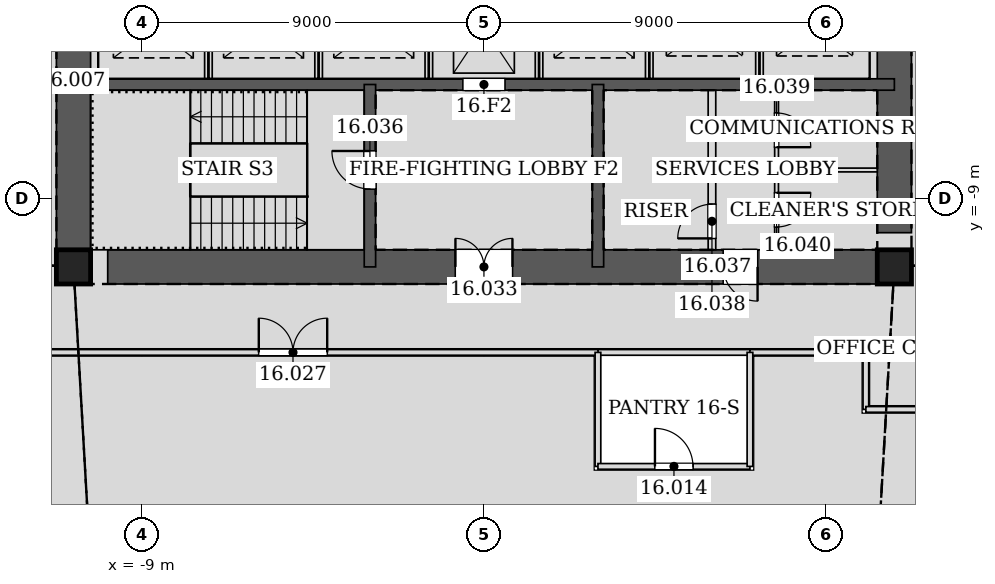
"""IFC4 building model, lengths in metres.
Left out: names, types, materials, properties, quantities, classifications, styles, units other than length and angle.
Written with IfcOpenShell. Run it as: python <this file> out.ifc"""

import sys

from ifc_helpers import new_model, si_unit, direction, frame, frame_2d, origin, origin_2d, place, context, subcontext, project, spatial, rectangle, hollow_rectangle, extrude, element, fill, save


model = new_model("IFC4")
c1 = context("Model", 3, precision=1e-05, world=origin(), true_north=direction((0.0, 1.0)))
c2 = subcontext(c1, "Body", "Model", "MODEL_VIEW")
j1 = project(units=[si_unit("LENGTHUNIT", "METRE"), si_unit("PLANEANGLEUNIT", "RADIAN")], contexts=[c1])
p1 = place(None, origin())
s1 = spatial("IfcSite", under=j1, at=p1, CompositionType="ELEMENT")
p2 = place(p1, origin())
s2 = spatial("IfcBuilding", under=s1, at=p2, CompositionType="ELEMENT")
p3 = place(p2, frame((0.0, 0.0, 75.0)))
s3 = spatial("IfcBuildingStorey", under=s2, at=p3, CompositionType="ELEMENT", Elevation=75.0)
for number, where, z_axis, x_axis in (
    (1, (-10.8, -10.8, 0.0), (0.0, 0.0, 1.0), (1.0, 0.0, 0.0)),
    (2, (10.8, -10.8, 0.0), (0.0, 0.0, 1.0), (1.0, 0.0, 0.0)),
):
    element("IfcColumn", number, at=place(p3, frame(where, z_axis=z_axis, x_axis=x_axis)), inside=s3, PredefinedType="COLUMN", context=c2, shape_type="SweptSolid", body=[
        extrude(hollow_rectangle(XDim=0.9, YDim=0.9, WallThickness=0.06, at=origin_2d()), origin(), (0.0, 0.0, 1.0), 4.2),
    ])
p4 = place(p3, frame((-10.8, -10.8, 0.0), z_axis=(0.0, 0.0, 1.0), x_axis=(1.0, 0.0, 0.0)))
e3 = element("IfcWall", 3, at=p4, inside=s3, PredefinedType="SOLIDWALL", context=c2, shape_type="SweptSolid", body=[
    extrude(rectangle(XDim=21.6, YDim=0.9, at=frame_2d((10.8, 0.0))), origin(), (0.0, 0.0, 1.0), 4.2),
])
p5 = place(p4, frame((10.05, 0.0, 0.0)))
e4 = element("IfcOpeningElement", 4, at=p5, cuts=e3, PredefinedType="OPENING", context=c2, shape_type="SweptSolid", body=[
    extrude(rectangle(XDim=1.5, YDim=2.1, at=frame_2d((0.75, 1.05))), frame((0.0, 0.46, 0.0), z_axis=(0.0, -1.0, 0.0), x_axis=(1.0, 0.0, 0.0)), (0.0, 0.0, 1.0), 0.92),
])
p6 = place(p4, frame((17.1, 0.0, 0.0)))
e5 = element("IfcOpeningElement", 5, at=p6, cuts=e3, PredefinedType="OPENING", context=c2, shape_type="SweptSolid", body=[
    extrude(rectangle(XDim=0.9, YDim=2.1, at=frame_2d((0.45, 1.05))), frame((0.0, 0.46, 0.0), z_axis=(0.0, -1.0, 0.0), x_axis=(1.0, 0.0, 0.0)), (0.0, 0.0, 1.0), 0.92),
])
p7 = place(p3, frame((10.8, -10.8, 0.0), z_axis=(0.0, 0.0, 1.0), x_axis=(0.0, 1.0, 0.0)))
e6 = element("IfcWall", 6, at=p7, inside=s3, PredefinedType="SOLIDWALL", context=c2, shape_type="SweptSolid", body=[
    extrude(rectangle(XDim=21.6, YDim=0.9, at=frame_2d((10.8, 0.0))), origin(), (0.0, 0.0, 1.0), 4.2),
])
p8 = place(p7, frame((11.7, 0.0, 0.0)))
e7 = element("IfcOpeningElement", 7, at=p8, cuts=e6, PredefinedType="OPENING", context=c2, shape_type="SweptSolid", body=[
    extrude(rectangle(XDim=1.2, YDim=2.1, at=frame_2d((0.6, 1.05))), frame((0.0, 0.46, 0.0), z_axis=(0.0, -1.0, 0.0), x_axis=(1.0, 0.0, 0.0)), (0.0, 0.0, 1.0), 0.92),
])
p9 = place(p7, frame((8.7, 0.0, 0.0)))
e8 = element("IfcOpeningElement", 8, at=p9, cuts=e6, PredefinedType="OPENING", context=c2, shape_type="SweptSolid", body=[
    extrude(rectangle(XDim=1.2, YDim=2.1, at=frame_2d((0.6, 1.05))), frame((0.0, 0.46, 0.0), z_axis=(0.0, -1.0, 0.0), x_axis=(1.0, 0.0, 0.0)), (0.0, 0.0, 1.0), 0.92),
])
p10 = place(p3, frame((-10.8, 10.8, 0.0), z_axis=(0.0, 0.0, 1.0), x_axis=(0.0, -1.0, 0.0)))
e9 = element("IfcWall", 9, at=p10, inside=s3, PredefinedType="SOLIDWALL", context=c2, shape_type="SweptSolid", body=[
    extrude(rectangle(XDim=21.6, YDim=0.9, at=frame_2d((10.8, 0.0))), origin(), (0.0, 0.0, 1.0), 4.2),
])
p11 = place(p10, frame((8.7, 0.0, 0.0)))
e10 = element("IfcOpeningElement", 10, at=p11, cuts=e9, PredefinedType="OPENING", context=c2, shape_type="SweptSolid", body=[
    extrude(rectangle(XDim=1.2, YDim=2.1, at=frame_2d((0.6, 1.05))), frame((0.0, 0.46, 0.0), z_axis=(0.0, -1.0, 0.0), x_axis=(1.0, 0.0, 0.0)), (0.0, 0.0, 1.0), 0.92),
])
p12 = place(p10, frame((11.7, 0.0, 0.0)))
e11 = element("IfcOpeningElement", 11, at=p12, cuts=e9, PredefinedType="OPENING", context=c2, shape_type="SweptSolid", body=[
    extrude(rectangle(XDim=1.2, YDim=2.1, at=frame_2d((0.6, 1.05))), frame((0.0, 0.46, 0.0), z_axis=(0.0, -1.0, 0.0), x_axis=(1.0, 0.0, 0.0)), (0.0, 0.0, 1.0), 0.92),
])
p13 = place(p3, frame((-10.8, -6.0, 0.0), z_axis=(0.0, 0.0, 1.0), x_axis=(1.0, 0.0, 0.0)))
e12 = element("IfcWall", 12, at=p13, inside=s3, PredefinedType="SOLIDWALL", context=c2, shape_type="SweptSolid", body=[
    extrude(rectangle(XDim=21.6, YDim=0.3, at=frame_2d((10.8, 0.0))), origin(), (0.0, 0.0, 1.0), 4.2),
])
p14 = place(p13, frame((10.25, 0.0, 0.0)))
e13 = element("IfcOpeningElement", 13, at=p14, cuts=e12, PredefinedType="OPENING", context=c2, shape_type="SweptSolid", body=[
    extrude(rectangle(XDim=1.1, YDim=2.1, at=frame_2d((0.55, 1.05))), frame((0.0, 0.16, 0.0), z_axis=(0.0, -1.0, 0.0), x_axis=(1.0, 0.0, 0.0)), (0.0, 0.0, 1.0), 0.32),
])
p15 = place(p3, frame((-3.0, -6.0, 0.0), z_axis=(0.0, 0.0, 1.0), x_axis=(0.0, -1.0, 0.0)))
e14 = element("IfcWall", 14, at=p15, inside=s3, PredefinedType="SOLIDWALL", context=c2, shape_type="SweptSolid", body=[
    extrude(rectangle(XDim=4.8, YDim=0.3, at=frame_2d((2.4, 0.0))), origin(), (0.0, 0.0, 1.0), 4.2),
])
p16 = place(p15, frame((1.75, 0.0, 0.0)))
e15 = element("IfcOpeningElement", 15, at=p16, cuts=e14, PredefinedType="OPENING", context=c2, shape_type="SweptSolid", body=[
    extrude(rectangle(XDim=1.0, YDim=2.1, at=frame_2d((0.5, 1.05))), frame((0.0, 0.16, 0.0), z_axis=(0.0, -1.0, 0.0), x_axis=(1.0, 0.0, 0.0)), (0.0, 0.0, 1.0), 0.32),
])
p17 = place(p3, frame((3.0, -6.0, 0.0), z_axis=(0.0, 0.0, 1.0), x_axis=(0.0, -1.0, 0.0)))
e16 = element("IfcWall", 16, at=p17, inside=s3, PredefinedType="SOLIDWALL", context=c2, shape_type="SweptSolid", body=[
    extrude(rectangle(XDim=4.8, YDim=0.3, at=frame_2d((2.4, 0.0))), origin(), (0.0, 0.0, 1.0), 4.2),
])
p18 = place(p3, frame((2.999, -13.05, 0.0), z_axis=(0.0, 0.0, 1.0), x_axis=(1.0, 0.0, 0.0)))
e17 = element("IfcWall", 17, at=p18, inside=s3, PredefinedType="PARTITIONING", context=c2, shape_type="SweptSolid", body=[
    extrude(rectangle(XDim=4.002, YDim=0.15, at=frame_2d((2.001, 0.0))), origin(), (0.0, 0.0, 1.0), 4.035),
])
p19 = place(p3, frame((-13.05, -13.05, 0.0), z_axis=(0.0, 0.0, 1.0), x_axis=(1.0, 0.0, 0.0)))
e18 = element("IfcWall", 18, at=p19, inside=s3, PredefinedType="PARTITIONING", context=c2, shape_type="SweptSolid", body=[
    extrude(rectangle(XDim=16.051, YDim=0.15, at=frame_2d((8.025, 0.0))), origin(), (0.0, 0.0, 1.0), 3.014),
])
p20 = place(p19, frame((7.125, 0.0, 0.0)))
e19 = element("IfcOpeningElement", 19, at=p20, cuts=e18, PredefinedType="OPENING", context=c2, shape_type="SweptSolid", body=[
    extrude(rectangle(XDim=1.8, YDim=2.4, at=frame_2d((0.9, 1.2))), frame((0.0, 0.085, 0.0), z_axis=(0.0, -1.0, 0.0), x_axis=(1.0, 0.0, 0.0)), (0.0, 0.0, 1.0), 0.17),
])
p21 = place(p3, frame((6.999, -13.05, 0.0), z_axis=(0.0, 0.0, 1.0), x_axis=(1.0, 0.0, 0.0)))
e20 = element("IfcWall", 20, at=p21, inside=s3, PredefinedType="PARTITIONING", context=c2, shape_type="SweptSolid", body=[
    extrude(rectangle(XDim=3.051, YDim=0.15, at=frame_2d((1.525, 0.0))), origin(), (0.0, 0.0, 1.0), 4.035),
])
p22 = place(p3, frame((10.05, -13.05, 0.0), z_axis=(0.0, 0.0, 1.0), x_axis=(0.0, -1.0, 0.0)))
e21 = element("IfcWall", 21, at=p22, inside=s3, PredefinedType="PARTITIONING", context=c2, shape_type="SweptSolid", body=[
    extrude(rectangle(XDim=1.5, YDim=0.15, at=frame_2d((0.75, 0.0))), origin(), (0.0, 0.0, 1.0), 3.492),
])
p23 = place(p3, frame((10.05, -14.55, 0.0), z_axis=(0.0, 0.0, 1.0), x_axis=(1.0, 0.0, 0.0)))
e22 = element("IfcWall", 22, at=p23, inside=s3, PredefinedType="PARTITIONING", context=c2, shape_type="SweptSolid", body=[
    extrude(rectangle(XDim=4.5, YDim=0.15, at=frame_2d((2.25, 0.0))), origin(), (0.0, 0.0, 1.0), 3.014),
])
p24 = place(p3, frame((3.0, -13.05, 0.0), z_axis=(0.0, 0.0, 1.0), x_axis=(0.0, -1.0, 0.0)))
e23 = element("IfcWall", 23, at=p24, inside=s3, PredefinedType="PARTITIONING", context=c2, shape_type="SweptSolid", body=[
    extrude(rectangle(XDim=3.0, YDim=0.15, at=frame_2d((1.5, 0.0))), origin(), (0.0, 0.0, 1.0), 3.492),
])
p25 = place(p3, frame((3.0, -16.05, 0.0), z_axis=(0.0, 0.0, 1.0), x_axis=(1.0, 0.0, 0.0)))
e24 = element("IfcWall", 24, at=p25, inside=s3, PredefinedType="PARTITIONING", context=c2, shape_type="SweptSolid", body=[
    extrude(rectangle(XDim=4.0, YDim=0.15, at=frame_2d((2.0, 0.0))), origin(), (0.0, 0.0, 1.0), 4.035),
])
p26 = place(p25, frame((1.5, 0.0, 0.0)))
e25 = element("IfcOpeningElement", 25, at=p26, cuts=e24, PredefinedType="OPENING", context=c2, shape_type="SweptSolid", body=[
    extrude(rectangle(XDim=1.0, YDim=2.1, at=frame_2d((0.5, 1.05))), frame((0.0, 0.085, 0.0), z_axis=(0.0, -1.0, 0.0), x_axis=(1.0, 0.0, 0.0)), (0.0, 0.0, 1.0), 0.17),
])
p27 = place(p3, frame((7.0, -16.05, 0.0), z_axis=(0.0, 0.0, 1.0), x_axis=(0.0, 1.0, 0.0)))
e26 = element("IfcWall", 26, at=p27, inside=s3, PredefinedType="PARTITIONING", context=c2, shape_type="SweptSolid", body=[
    extrude(rectangle(XDim=3.0, YDim=0.15, at=frame_2d((1.5, 0.0))), origin(), (0.0, 0.0, 1.0), 3.492),
])
for number, where, z_axis, x_axis in (
    (27, (-7.25, -5.85, 0.0), (0.0, 0.0, 1.0), (0.0, 1.0, 0.0)),
    (28, (-4.35, -5.85, 0.0), (0.0, 0.0, 1.0), (0.0, 1.0, 0.0)),
    (29, (-1.45, -5.85, 0.0), (0.0, 0.0, 1.0), (0.0, 1.0, 0.0)),
    (30, (1.45, -5.85, 0.0), (0.0, 0.0, 1.0), (0.0, 1.0, 0.0)),
    (31, (4.35, -5.85, 0.0), (0.0, 0.0, 1.0), (0.0, 1.0, 0.0)),
    (32, (7.25, -5.85, 0.0), (0.0, 0.0, 1.0), (0.0, 1.0, 0.0)),
):
    element("IfcWall", number, at=place(p3, frame(where, z_axis=z_axis, x_axis=x_axis)), inside=s3, PredefinedType="PARTITIONING", context=c2, shape_type="SweptSolid", body=[
        extrude(rectangle(XDim=2.7, YDim=0.2, at=frame_2d((1.35, 0.0))), origin(), (0.0, 0.0, 1.0), 4.2),
    ])
p28 = place(p3, frame((6.0, -10.35, 0.0), z_axis=(0.0, 0.0, 1.0), x_axis=(0.0, 1.0, 0.0)))
e33 = element("IfcWall", 33, at=p28, inside=s3, PredefinedType="PARTITIONING", context=c2, shape_type="SweptSolid", body=[
    extrude(rectangle(XDim=4.2, YDim=0.2, at=frame_2d((2.1, 0.0))), origin(), (0.0, 0.0, 1.0), 4.035),
])
p29 = place(p28, frame((0.3, 0.0, 0.0)))
e34 = element("IfcOpeningElement", 34, at=p29, cuts=e33, PredefinedType="OPENING", context=c2, shape_type="SweptSolid", body=[
    extrude(rectangle(XDim=0.9, YDim=2.1, at=frame_2d((0.45, 1.05))), frame((0.0, 0.11, 0.0), z_axis=(0.0, -1.0, 0.0), x_axis=(1.0, 0.0, 0.0)), (0.0, 0.0, 1.0), 0.22),
])
p30 = place(p3, frame((7.7, -10.35, 0.0), z_axis=(0.0, 0.0, 1.0), x_axis=(0.0, 1.0, 0.0)))
e35 = element("IfcWall", 35, at=p30, inside=s3, PredefinedType="PARTITIONING", context=c2, shape_type="SweptSolid", body=[
    extrude(rectangle(XDim=4.2, YDim=0.1, at=frame_2d((2.1, 0.0))), origin(), (0.0, 0.0, 1.0), 4.035),
])
p31 = place(p30, frame((2.7, 0.0, 0.0)))
e36 = element("IfcOpeningElement", 36, at=p31, cuts=e35, PredefinedType="OPENING", context=c2, shape_type="SweptSolid", body=[
    extrude(rectangle(XDim=0.9, YDim=2.1, at=frame_2d((0.45, 1.05))), frame((0.0, 0.06, 0.0), z_axis=(0.0, -1.0, 0.0), x_axis=(1.0, 0.0, 0.0)), (0.0, 0.0, 1.0), 0.12),
])
p32 = place(p30, frame((0.6, 0.0, 0.0)))
e37 = element("IfcOpeningElement", 37, at=p32, cuts=e35, PredefinedType="OPENING", context=c2, shape_type="SweptSolid", body=[
    extrude(rectangle(XDim=0.9, YDim=2.1, at=frame_2d((0.45, 1.05))), frame((0.0, 0.06, 0.0), z_axis=(0.0, -1.0, 0.0), x_axis=(1.0, 0.0, 0.0)), (0.0, 0.0, 1.0), 0.12),
])
p33 = place(p3, frame((7.7, -8.25, 0.0), z_axis=(0.0, 0.0, 1.0), x_axis=(1.0, 0.0, 0.0)))
e38 = element("IfcWall", 38, at=p33, inside=s3, PredefinedType="PARTITIONING", context=c2, shape_type="SweptSolid", body=[
    extrude(rectangle(XDim=2.65, YDim=0.1, at=frame_2d((1.325, 0.0))), origin(), (0.0, 0.0, 1.0), 4.035),
])
p34 = place(p26, origin())
e39 = element("IfcDoor", 39, at=p34, inside=s3, OperationType="SINGLE_SWING_LEFT", PredefinedType="DOOR", context=c2, shape_type="SweptSolid", body=[
    extrude(rectangle(XDim=1.0, YDim=2.1, at=frame_2d((0.5, 1.05))), frame((0.0, 0.025, 0.0), z_axis=(0.0, -1.0, 0.0), x_axis=(1.0, 0.0, 0.0)), (0.0, 0.0, 1.0), 0.05),
])
fill(e25, e39)
p35 = place(p20, origin())
e40 = element("IfcDoor", 40, at=p35, inside=s3, OperationType="DOUBLE_DOOR_SINGLE_SWING", PredefinedType="DOOR", context=c2, shape_type="SweptSolid", body=[
    extrude(rectangle(XDim=1.8, YDim=2.4, at=frame_2d((0.9, 1.2))), frame((0.0, 0.025, 0.0), z_axis=(0.0, -1.0, 0.0), x_axis=(1.0, 0.0, 0.0)), (0.0, 0.0, 1.0), 0.05),
])
fill(e19, e40)
p36 = place(p5, origin())
e41 = element("IfcDoor", 41, at=p36, inside=s3, OperationType="DOUBLE_DOOR_SINGLE_SWING", PredefinedType="DOOR", context=c2, shape_type="SweptSolid", body=[
    extrude(rectangle(XDim=1.5, YDim=2.1, at=frame_2d((0.75, 1.05))), frame((0.0, 0.025, 0.0), z_axis=(0.0, -1.0, 0.0), x_axis=(1.0, 0.0, 0.0)), (0.0, 0.0, 1.0), 0.05),
])
fill(e4, e41)
p37 = place(p16, frame((1.0, 0.0, 0.0), z_axis=(0.0, 0.0, 1.0), x_axis=(-1.0, 0.0, 0.0)))
e42 = element("IfcDoor", 42, at=p37, inside=s3, OperationType="SINGLE_SWING_RIGHT", PredefinedType="DOOR", context=c2, shape_type="SweptSolid", body=[
    extrude(rectangle(XDim=1.0, YDim=2.1, at=frame_2d((0.5, 1.05))), frame((0.0, 0.025, 0.0), z_axis=(0.0, -1.0, 0.0), x_axis=(1.0, 0.0, 0.0)), (0.0, 0.0, 1.0), 0.05),
])
fill(e15, e42)
p38 = place(p6, frame((0.9, 0.0, 0.0), z_axis=(0.0, 0.0, 1.0), x_axis=(-1.0, 0.0, 0.0)))
e43 = element("IfcDoor", 43, at=p38, inside=s3, OperationType="SINGLE_SWING_LEFT", PredefinedType="DOOR", context=c2, shape_type="SweptSolid", body=[
    extrude(rectangle(XDim=0.9, YDim=2.1, at=frame_2d((0.45, 1.05))), frame((0.0, 0.025, 0.0), z_axis=(0.0, -1.0, 0.0), x_axis=(1.0, 0.0, 0.0)), (0.0, 0.0, 1.0), 0.05),
])
fill(e5, e43)
p39 = place(p29, origin())
e44 = element("IfcDoor", 44, at=p39, inside=s3, OperationType="SINGLE_SWING_LEFT", PredefinedType="DOOR", context=c2, shape_type="SweptSolid", body=[
    extrude(rectangle(XDim=0.9, YDim=2.1, at=frame_2d((0.45, 1.05))), frame((0.0, 0.025, 0.0), z_axis=(0.0, -1.0, 0.0), x_axis=(1.0, 0.0, 0.0)), (0.0, 0.0, 1.0), 0.05),
])
fill(e34, e44)
p40 = place(p31, frame((0.9, 0.0, 0.0), z_axis=(0.0, 0.0, 1.0), x_axis=(-1.0, 0.0, 0.0)))
e45 = element("IfcDoor", 45, at=p40, inside=s3, OperationType="SINGLE_SWING_RIGHT", PredefinedType="DOOR", context=c2, shape_type="SweptSolid", body=[
    extrude(rectangle(XDim=0.9, YDim=2.1, at=frame_2d((0.45, 1.05))), frame((0.0, 0.025, 0.0), z_axis=(0.0, -1.0, 0.0), x_axis=(1.0, 0.0, 0.0)), (0.0, 0.0, 1.0), 0.05),
])
fill(e36, e45)
p41 = place(p32, frame((0.9, 0.0, 0.0), z_axis=(0.0, 0.0, 1.0), x_axis=(-1.0, 0.0, 0.0)))
e46 = element("IfcDoor", 46, at=p41, inside=s3, OperationType="SINGLE_SWING_LEFT", PredefinedType="DOOR", context=c2, shape_type="SweptSolid", body=[
    extrude(rectangle(XDim=0.9, YDim=2.1, at=frame_2d((0.45, 1.05))), frame((0.0, 0.025, 0.0), z_axis=(0.0, -1.0, 0.0), x_axis=(1.0, 0.0, 0.0)), (0.0, 0.0, 1.0), 0.05),
])
fill(e37, e46)
p42 = place(p14, origin())
e47 = element("IfcDoor", 47, at=p42, inside=s3, OperationType="DOUBLE_DOOR_SLIDING", PredefinedType="DOOR", context=c2, shape_type="SweptSolid", body=[
    extrude(rectangle(XDim=1.1, YDim=2.1, at=frame_2d((0.55, 1.05))), frame((0.0, 0.025, 0.0), z_axis=(0.0, -1.0, 0.0), x_axis=(1.0, 0.0, 0.0)), (0.0, 0.0, 1.0), 0.05),
])
fill(e13, e47)
save(model, sys.argv[1])
